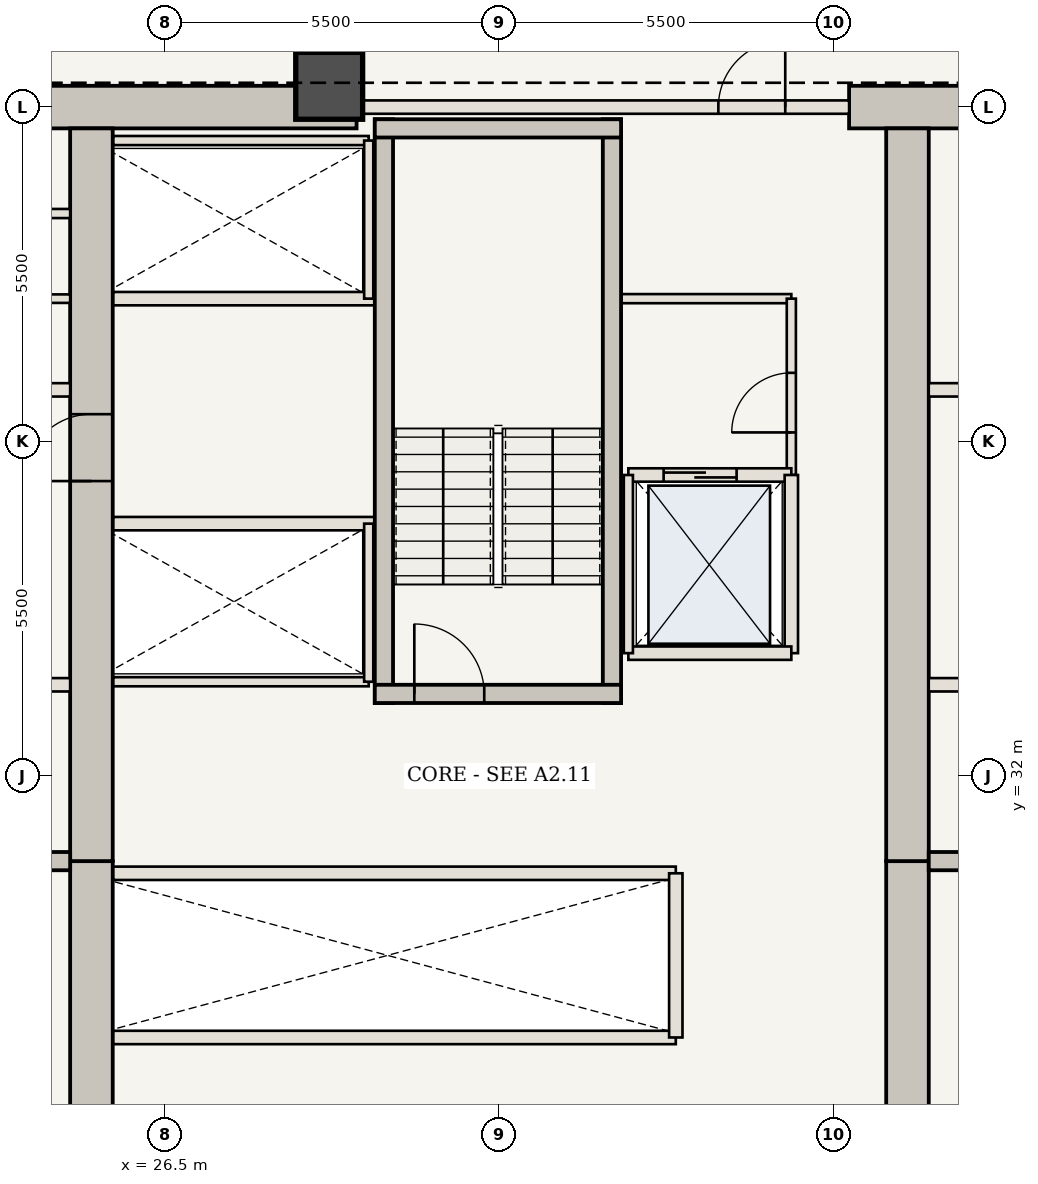
"""IFC4 building model, lengths in metres.
Left out: names, types, materials, properties, quantities, classifications, styles, units other than length and angle.
Written with IfcOpenShell. Run it as: python <this file> out.ifc"""

import sys

from ifc_helpers import new_model, si_unit, direction, frame, frame_2d, origin, origin_2d, place, context, subcontext, project, spatial, rectangle, extrude, element, fill, save


model = new_model("IFC4")
c1 = context("Model", 3, precision=1e-05, world=origin(), true_north=direction((0.0, 1.0)))
c2 = subcontext(c1, "Body", "Model", "MODEL_VIEW")
j1 = project(units=[si_unit("LENGTHUNIT", "METRE"), si_unit("PLANEANGLEUNIT", "RADIAN")], contexts=[c1])
p1 = place(None, origin())
s1 = spatial("IfcSite", under=j1, at=p1, CompositionType="ELEMENT")
p2 = place(p1, origin())
s2 = spatial("IfcBuilding", under=s1, at=p2, CompositionType="ELEMENT")
p3 = place(p2, frame((0.0, 0.0, 42.35)))
s3 = spatial("IfcBuildingStorey", under=s2, at=p3, CompositionType="ELEMENT", Elevation=42.35)
p4 = place(p3, frame((21.41, 43.0, 0.0), z_axis=(0.0, 0.0, 1.0), x_axis=(1.0, 0.0, 0.0)))
e1 = element("IfcWall", 1, at=p4, inside=s3, PredefinedType="SHEAR", context=c2, shape_type="SweptSolid", body=[
    extrude(rectangle(XDim=8.24, YDim=0.7, at=frame_2d((4.12, 0.0))), origin(), (0.0, 0.0, 1.0), 3.5),
])
p5 = place(p3, frame((37.75, 43.0, 0.0), z_axis=(0.0, 0.0, 1.0), x_axis=(1.0, 0.0, 0.0)))
e2 = element("IfcWall", 2, at=p5, inside=s3, PredefinedType="SHEAR", context=c2, shape_type="SweptSolid", body=[
    extrude(rectangle(XDim=4.84, YDim=0.7, at=frame_2d((2.42, 0.0))), origin(), (0.0, 0.0, 1.0), 3.5),
])
p6 = place(p3, frame((25.29, 21.3, 0.0), z_axis=(0.0, 0.0, 1.0), x_axis=(0.0, 1.0, 0.0)))
e3 = element("IfcWall", 3, at=p6, inside=s3, PredefinedType="SHEAR", context=c2, shape_type="SweptSolid", body=[
    extrude(rectangle(XDim=9.3, YDim=0.7, at=frame_2d((4.65, 0.0))), origin(), (0.0, 0.0, 1.0), 3.5),
])
p7 = place(p3, frame((25.29, 30.6, 0.0), z_axis=(0.0, 0.0, 1.0), x_axis=(0.0, 1.0, 0.0)))
e4 = element("IfcWall", 4, at=p7, inside=s3, PredefinedType="SHEAR", context=c2, shape_type="SweptSolid", body=[
    extrude(rectangle(XDim=12.05, YDim=0.7, at=frame_2d((6.025, 0.0))), origin(), (0.0, 0.0, 1.0), 3.5),
])
p8 = place(p7, frame((6.25, 0.0, 0.0)))
e5 = element("IfcOpeningElement", 5, at=p8, cuts=e4, PredefinedType="OPENING", context=c2, shape_type="SweptSolid", body=[
    extrude(rectangle(XDim=1.1, YDim=2.15, at=frame_2d((0.55, 1.075))), frame((0.0, 0.36, 0.0), z_axis=(0.0, -1.0, 0.0), x_axis=(1.0, 0.0, 0.0)), (0.0, 0.0, 1.0), 0.72),
])
p9 = place(p3, frame((38.71, 21.3, 0.0), z_axis=(0.0, 0.0, 1.0), x_axis=(0.0, 1.0, 0.0)))
e6 = element("IfcWall", 6, at=p9, inside=s3, PredefinedType="SHEAR", context=c2, shape_type="SweptSolid", body=[
    extrude(rectangle(XDim=9.3, YDim=0.7, at=frame_2d((4.65, 0.0))), origin(), (0.0, 0.0, 1.0), 3.5),
])
p10 = place(p3, frame((38.71, 30.6, 0.0), z_axis=(0.0, 0.0, 1.0), x_axis=(0.0, 1.0, 0.0)))
e7 = element("IfcWall", 7, at=p10, inside=s3, PredefinedType="SHEAR", context=c2, shape_type="SweptSolid", body=[
    extrude(rectangle(XDim=12.05, YDim=0.7, at=frame_2d((6.025, 0.0))), origin(), (0.0, 0.0, 1.0), 3.5),
])
p11 = place(p3, frame((29.2, 43.35, 0.0), z_axis=(0.0, 0.0, 1.0), x_axis=(1.0, 0.0, 0.0)))
e8 = element("IfcColumn", 8, at=p11, inside=s3, PredefinedType="COLUMN", context=c2, shape_type="SweptSolid", body=[
    extrude(rectangle(XDim=1.1, YDim=1.1, at=origin_2d()), origin(), (0.0, 0.0, 1.0), 3.5),
])
for number, where, z_axis, x_axis in (
    (9, (21.41, 30.6, 0.0), (0.0, 0.0, 1.0), (1.0, 0.0, 0.0)),
    (10, (39.06, 30.6, 0.0), (0.0, 0.0, 1.0), (1.0, 0.0, 0.0)),
):
    element("IfcWall", number, at=place(p3, frame(where, z_axis=z_axis, x_axis=x_axis)), inside=s3, PredefinedType="SHEAR", context=c2, shape_type="SweptSolid", body=[
        extrude(rectangle(XDim=3.53, YDim=0.3, at=frame_2d((1.765, 0.0))), origin(), (0.0, 0.0, 1.0), 3.32),
    ])
p12 = place(p3, frame((21.41, 33.5, 0.0), z_axis=(0.0, 0.0, 1.0), x_axis=(1.0, 0.0, 0.0)))
e11 = element("IfcWall", 11, at=p12, inside=s3, PredefinedType="STANDARD", context=c2, shape_type="SweptSolid", body=[
    extrude(rectangle(XDim=3.53, YDim=0.22, at=frame_2d((1.765, 0.0))), origin(), (0.0, 0.0, 1.0), 3.32),
])
p13 = place(p12, frame((0.75, 0.0, 0.0)))
e12 = element("IfcOpeningElement", 12, at=p13, cuts=e11, PredefinedType="OPENING", context=c2, shape_type="SweptSolid", body=[
    extrude(rectangle(XDim=1.2, YDim=2.2, at=frame_2d((0.6, 1.1))), frame((0.0, 0.12, 0.0), z_axis=(0.0, -1.0, 0.0), x_axis=(1.0, 0.0, 0.0)), (0.0, 0.0, 1.0), 0.24),
])
p14 = place(p3, frame((39.06, 33.5, 0.0), z_axis=(0.0, 0.0, 1.0), x_axis=(1.0, 0.0, 0.0)))
e13 = element("IfcWall", 13, at=p14, inside=s3, PredefinedType="STANDARD", context=c2, shape_type="SweptSolid", body=[
    extrude(rectangle(XDim=3.53, YDim=0.22, at=frame_2d((1.765, 0.0))), origin(), (0.0, 0.0, 1.0), 3.32),
])
p15 = place(p14, frame((1.55, 0.0, 0.0)))
e14 = element("IfcOpeningElement", 14, at=p15, cuts=e13, PredefinedType="OPENING", context=c2, shape_type="SweptSolid", body=[
    extrude(rectangle(XDim=1.2, YDim=2.2, at=frame_2d((0.6, 1.1))), frame((0.0, 0.12, 0.0), z_axis=(0.0, -1.0, 0.0), x_axis=(1.0, 0.0, 0.0)), (0.0, 0.0, 1.0), 0.24),
])
for number, where, z_axis, x_axis in (
    (15, (21.41, 38.35, 0.0), (0.0, 0.0, 1.0), (1.0, 0.0, 0.0)),
    (16, (39.06, 38.35, 0.0), (0.0, 0.0, 1.0), (1.0, 0.0, 0.0)),
):
    element("IfcWall", number, at=place(p3, frame(where, z_axis=z_axis, x_axis=x_axis)), inside=s3, PredefinedType="STANDARD", context=c2, shape_type="SweptSolid", body=[
        extrude(rectangle(XDim=3.53, YDim=0.22, at=frame_2d((1.765, 0.0))), origin(), (0.0, 0.0, 1.0), 3.32),
    ])
p16 = place(p3, frame((21.41, 39.85, 0.0), z_axis=(0.0, 0.0, 1.0), x_axis=(1.0, 0.0, 0.0)))
e17 = element("IfcWall", 17, at=p16, inside=s3, PredefinedType="STANDARD", context=c2, shape_type="SweptSolid", body=[
    extrude(rectangle(XDim=3.53, YDim=0.14, at=frame_2d((1.765, 0.0))), origin(), (0.0, 0.0, 1.0), 3.32),
])
p17 = place(p3, frame((21.41, 41.25, 0.0), z_axis=(0.0, 0.0, 1.0), x_axis=(1.0, 0.0, 0.0)))
e18 = element("IfcWall", 18, at=p17, inside=s3, PredefinedType="STANDARD", context=c2, shape_type="SweptSolid", body=[
    extrude(rectangle(XDim=3.53, YDim=0.15, at=frame_2d((1.765, 0.0))), origin(), (0.0, 0.0, 1.0), 3.32),
])
p18 = place(p3, frame((34.0, 39.85, 0.0), z_axis=(0.0, 0.0, 1.0), x_axis=(1.0, 0.0, 0.0)))
e19 = element("IfcWall", 19, at=p18, inside=s3, PredefinedType="STANDARD", context=c2, shape_type="SweptSolid", body=[
    extrude(rectangle(XDim=2.8, YDim=0.15, at=frame_2d((1.4, 0.0))), origin(), (0.0, 0.0, 1.0), 3.32),
])
p19 = place(p3, frame((36.8, 36.95, 0.0), z_axis=(0.0, 0.0, 1.0), x_axis=(0.0, 1.0, 0.0)))
e20 = element("IfcWall", 20, at=p19, inside=s3, PredefinedType="STANDARD", context=c2, shape_type="SweptSolid", body=[
    extrude(rectangle(XDim=2.9, YDim=0.15, at=frame_2d((1.45, 0.0))), origin(), (0.0, 0.0, 1.0), 3.32),
])
p20 = place(p19, frame((0.7, 0.0, 0.0)))
e21 = element("IfcOpeningElement", 21, at=p20, cuts=e20, PredefinedType="OPENING", context=c2, shape_type="SweptSolid", body=[
    extrude(rectangle(XDim=0.98, YDim=2.2, at=frame_2d((0.49, 1.1))), frame((0.0, 0.085, 0.0), z_axis=(0.0, -1.0, 0.0), x_axis=(1.0, 0.0, 0.0)), (0.0, 0.0, 1.0), 0.17),
])
for number, where, z_axis, x_axis in (
    (22, (25.65, 27.7, 0.0), (0.0, 0.0, 1.0), (1.0, 0.0, 0.0)),
    (23, (25.65, 30.4, 0.0), (0.0, 0.0, 1.0), (1.0, 0.0, 0.0)),
):
    element("IfcWall", number, at=place(p3, frame(where, z_axis=z_axis, x_axis=x_axis)), inside=s3, PredefinedType="STANDARD", context=c2, shape_type="SweptSolid", body=[
        extrude(rectangle(XDim=9.25, YDim=0.22, at=frame_2d((4.625, 0.0))), origin(), (0.0, 0.0, 1.0), 3.32),
    ])
p21 = place(p3, frame((34.9, 27.7, 0.0), z_axis=(0.0, 0.0, 1.0), x_axis=(0.0, 1.0, 0.0)))
e24 = element("IfcWall", 24, at=p21, inside=s3, PredefinedType="STANDARD", context=c2, shape_type="SweptSolid", body=[
    extrude(rectangle(XDim=2.7, YDim=0.22, at=frame_2d((1.35, 0.0))), origin(), (0.0, 0.0, 1.0), 3.32),
])
p22 = place(p3, frame((25.65, 36.15, 0.0), z_axis=(0.0, 0.0, 1.0), x_axis=(1.0, 0.0, 0.0)))
e25 = element("IfcWall", 25, at=p22, inside=s3, PredefinedType="STANDARD", context=c2, shape_type="SweptSolid", body=[
    extrude(rectangle(XDim=4.3, YDim=0.22, at=frame_2d((2.15, 0.0))), origin(), (0.0, 0.0, 1.0), 3.32),
])
p23 = place(p3, frame((25.65, 33.55, 0.0), z_axis=(0.0, 0.0, 1.0), x_axis=(1.0, 0.0, 0.0)))
e26 = element("IfcWall", 26, at=p23, inside=s3, PredefinedType="STANDARD", context=c2, shape_type="SweptSolid", body=[
    extrude(rectangle(XDim=4.2, YDim=0.15, at=frame_2d((2.1, 0.0))), origin(), (0.0, 0.0, 1.0), 3.32),
])
p24 = place(p3, frame((29.85, 33.55, 0.0), z_axis=(0.0, 0.0, 1.0), x_axis=(0.0, 1.0, 0.0)))
e27 = element("IfcWall", 27, at=p24, inside=s3, PredefinedType="STANDARD", context=c2, shape_type="SweptSolid", body=[
    extrude(rectangle(XDim=2.6, YDim=0.15, at=frame_2d((1.3, 0.0))), origin(), (0.0, 0.0, 1.0), 3.32),
])
p25 = place(p3, frame((25.65, 39.85, 0.0), z_axis=(0.0, 0.0, 1.0), x_axis=(1.0, 0.0, 0.0)))
e28 = element("IfcWall", 28, at=p25, inside=s3, PredefinedType="STANDARD", context=c2, shape_type="SweptSolid", body=[
    extrude(rectangle(XDim=4.3, YDim=0.22, at=frame_2d((2.15, 0.0))), origin(), (0.0, 0.0, 1.0), 3.32),
])
p26 = place(p3, frame((25.65, 42.45, 0.0), z_axis=(0.0, 0.0, 1.0), x_axis=(1.0, 0.0, 0.0)))
e29 = element("IfcWall", 29, at=p26, inside=s3, PredefinedType="STANDARD", context=c2, shape_type="SweptSolid", body=[
    extrude(rectangle(XDim=4.2, YDim=0.15, at=frame_2d((2.1, 0.0))), origin(), (0.0, 0.0, 1.0), 3.32),
])
p27 = place(p3, frame((29.85, 39.85, 0.0), z_axis=(0.0, 0.0, 1.0), x_axis=(0.0, 1.0, 0.0)))
e30 = element("IfcWall", 30, at=p27, inside=s3, PredefinedType="STANDARD", context=c2, shape_type="SweptSolid", body=[
    extrude(rectangle(XDim=2.6, YDim=0.15, at=frame_2d((1.3, 0.0))), origin(), (0.0, 0.0, 1.0), 3.32),
])
for number, where, z_axis, x_axis in (
    (31, (30.1, 33.2, 0.0), (0.0, 0.0, 1.0), (0.0, 1.0, 0.0)),
    (32, (33.85, 33.2, 0.0), (0.0, 0.0, 1.0), (0.0, 1.0, 0.0)),
):
    element("IfcWall", number, at=place(p3, frame(where, z_axis=z_axis, x_axis=x_axis)), inside=s3, PredefinedType="SHEAR", context=c2, shape_type="SweptSolid", body=[
        extrude(rectangle(XDim=9.6, YDim=0.3, at=frame_2d((4.8, 0.0))), origin(), (0.0, 0.0, 1.0), 3.32),
    ])
p28 = place(p3, frame((29.95, 33.35, 0.0), z_axis=(0.0, 0.0, 1.0), x_axis=(1.0, 0.0, 0.0)))
e33 = element("IfcWall", 33, at=p28, inside=s3, PredefinedType="SHEAR", context=c2, shape_type="SweptSolid", body=[
    extrude(rectangle(XDim=4.05, YDim=0.3, at=frame_2d((2.025, 0.0))), origin(), (0.0, 0.0, 1.0), 3.32),
])
p29 = place(p28, frame((0.65, 0.0, 0.0)))
e34 = element("IfcOpeningElement", 34, at=p29, cuts=e33, PredefinedType="OPENING", context=c2, shape_type="SweptSolid", body=[
    extrude(rectangle(XDim=1.15, YDim=2.15, at=frame_2d((0.575, 1.075))), frame((0.0, 0.16, 0.0), z_axis=(0.0, -1.0, 0.0), x_axis=(1.0, 0.0, 0.0)), (0.0, 0.0, 1.0), 0.32),
])
p30 = place(p3, frame((29.95, 42.65, 0.0), z_axis=(0.0, 0.0, 1.0), x_axis=(1.0, 0.0, 0.0)))
e35 = element("IfcWall", 35, at=p30, inside=s3, PredefinedType="SHEAR", context=c2, shape_type="SweptSolid", body=[
    extrude(rectangle(XDim=4.05, YDim=0.3, at=frame_2d((2.025, 0.0))), origin(), (0.0, 0.0, 1.0), 3.32),
])
p31 = place(p3, frame((29.65, 43.0, 0.0), z_axis=(0.0, 0.0, 1.0), x_axis=(1.0, 0.0, 0.0)))
e36 = element("IfcWall", 36, at=p31, inside=s3, PredefinedType="STANDARD", context=c2, shape_type="SweptSolid", body=[
    extrude(rectangle(XDim=8.1, YDim=0.22, at=frame_2d((4.05, 0.0))), origin(), (0.0, 0.0, 1.0), 3.32),
])
p32 = place(p31, frame((5.95, 0.0, 0.0)))
e37 = element("IfcOpeningElement", 37, at=p32, cuts=e36, PredefinedType="OPENING", context=c2, shape_type="SweptSolid", body=[
    extrude(rectangle(XDim=1.1, YDim=2.15, at=frame_2d((0.55, 1.075))), frame((0.0, 0.12, 0.0), z_axis=(0.0, -1.0, 0.0), x_axis=(1.0, 0.0, 0.0)), (0.0, 0.0, 1.0), 0.24),
])
p33 = place(p3, frame((34.12, 36.95, 0.0), z_axis=(0.0, 0.0, 1.0), x_axis=(1.0, 0.0, 0.0)))
e38 = element("IfcWall", 38, at=p33, inside=s3, PredefinedType="STANDARD", context=c2, shape_type="SweptSolid", body=[
    extrude(rectangle(XDim=2.68, YDim=0.22, at=frame_2d((1.34, 0.0))), origin(), (0.0, 0.0, 1.0), 3.32),
])
p34 = place(p33, frame((0.58, 0.0, 0.0)))
e39 = element("IfcOpeningElement", 39, at=p34, cuts=e38, PredefinedType="OPENING", context=c2, shape_type="SweptSolid", body=[
    extrude(rectangle(XDim=1.2, YDim=2.2, at=frame_2d((0.6, 1.1))), frame((0.0, 0.12, 0.0), z_axis=(0.0, -1.0, 0.0), x_axis=(1.0, 0.0, 0.0)), (0.0, 0.0, 1.0), 0.24),
])
p35 = place(p3, frame((36.8, 34.02, 0.0), z_axis=(0.0, 0.0, 1.0), x_axis=(0.0, 1.0, 0.0)))
e40 = element("IfcWall", 40, at=p35, inside=s3, PredefinedType="STANDARD", context=c2, shape_type="SweptSolid", body=[
    extrude(rectangle(XDim=2.93, YDim=0.22, at=frame_2d((1.465, 0.0))), origin(), (0.0, 0.0, 1.0), 3.32),
])
p36 = place(p3, frame((34.12, 34.02, 0.0), z_axis=(0.0, 0.0, 1.0), x_axis=(1.0, 0.0, 0.0)))
e41 = element("IfcWall", 41, at=p36, inside=s3, PredefinedType="STANDARD", context=c2, shape_type="SweptSolid", body=[
    extrude(rectangle(XDim=2.68, YDim=0.22, at=frame_2d((1.34, 0.0))), origin(), (0.0, 0.0, 1.0), 3.32),
])
p37 = place(p3, frame((34.12, 34.02, 0.0), z_axis=(0.0, 0.0, 1.0), x_axis=(0.0, 1.0, 0.0)))
e42 = element("IfcWall", 42, at=p37, inside=s3, PredefinedType="STANDARD", context=c2, shape_type="SweptSolid", body=[
    extrude(rectangle(XDim=2.93, YDim=0.15, at=frame_2d((1.465, 0.0))), origin(), (0.0, 0.0, 1.0), 3.32),
])
p38 = place(p8, origin())
e43 = element("IfcDoor", 43, at=p38, inside=s3, OperationType="SINGLE_SWING_LEFT", PredefinedType="DOOR", context=c2, shape_type="SweptSolid", body=[
    extrude(rectangle(XDim=1.1, YDim=2.15, at=frame_2d((0.55, 1.075))), frame((0.0, 0.025, 0.0), z_axis=(0.0, -1.0, 0.0), x_axis=(1.0, 0.0, 0.0)), (0.0, 0.0, 1.0), 0.05),
])
fill(e5, e43)
p39 = place(p20, origin())
e44 = element("IfcDoor", 44, at=p39, inside=s3, OperationType="SINGLE_SWING_LEFT", PredefinedType="DOOR", context=c2, shape_type="SweptSolid", body=[
    extrude(rectangle(XDim=0.98, YDim=2.2, at=frame_2d((0.49, 1.1))), frame((0.0, 0.025, 0.0), z_axis=(0.0, -1.0, 0.0), x_axis=(1.0, 0.0, 0.0)), (0.0, 0.0, 1.0), 0.05),
])
fill(e21, e44)
p40 = place(p29, origin())
e45 = element("IfcDoor", 45, at=p40, inside=s3, OperationType="SINGLE_SWING_LEFT", PredefinedType="DOOR", context=c2, shape_type="SweptSolid", body=[
    extrude(rectangle(XDim=1.15, YDim=2.15, at=frame_2d((0.575, 1.075))), frame((0.0, 0.025, 0.0), z_axis=(0.0, -1.0, 0.0), x_axis=(1.0, 0.0, 0.0)), (0.0, 0.0, 1.0), 0.05),
])
fill(e34, e45)
p41 = place(p32, origin())
e46 = element("IfcDoor", 46, at=p41, inside=s3, OperationType="SINGLE_SWING_RIGHT", PredefinedType="DOOR", context=c2, shape_type="SweptSolid", body=[
    extrude(rectangle(XDim=1.1, YDim=2.15, at=frame_2d((0.55, 1.075))), frame((0.0, 0.025, 0.0), z_axis=(0.0, -1.0, 0.0), x_axis=(1.0, 0.0, 0.0)), (0.0, 0.0, 1.0), 0.05),
])
fill(e37, e46)
p42 = place(p34, origin())
e47 = element("IfcDoor", 47, at=p42, inside=s3, OperationType="DOUBLE_DOOR_SLIDING", PredefinedType="DOOR", context=c2, shape_type="SweptSolid", body=[
    extrude(rectangle(XDim=1.2, YDim=2.2, at=frame_2d((0.6, 1.1))), frame((0.0, 0.025, 0.0), z_axis=(0.0, -1.0, 0.0), x_axis=(1.0, 0.0, 0.0)), (0.0, 0.0, 1.0), 0.05),
])
fill(e39, e47)
save(model, sys.argv[1])
